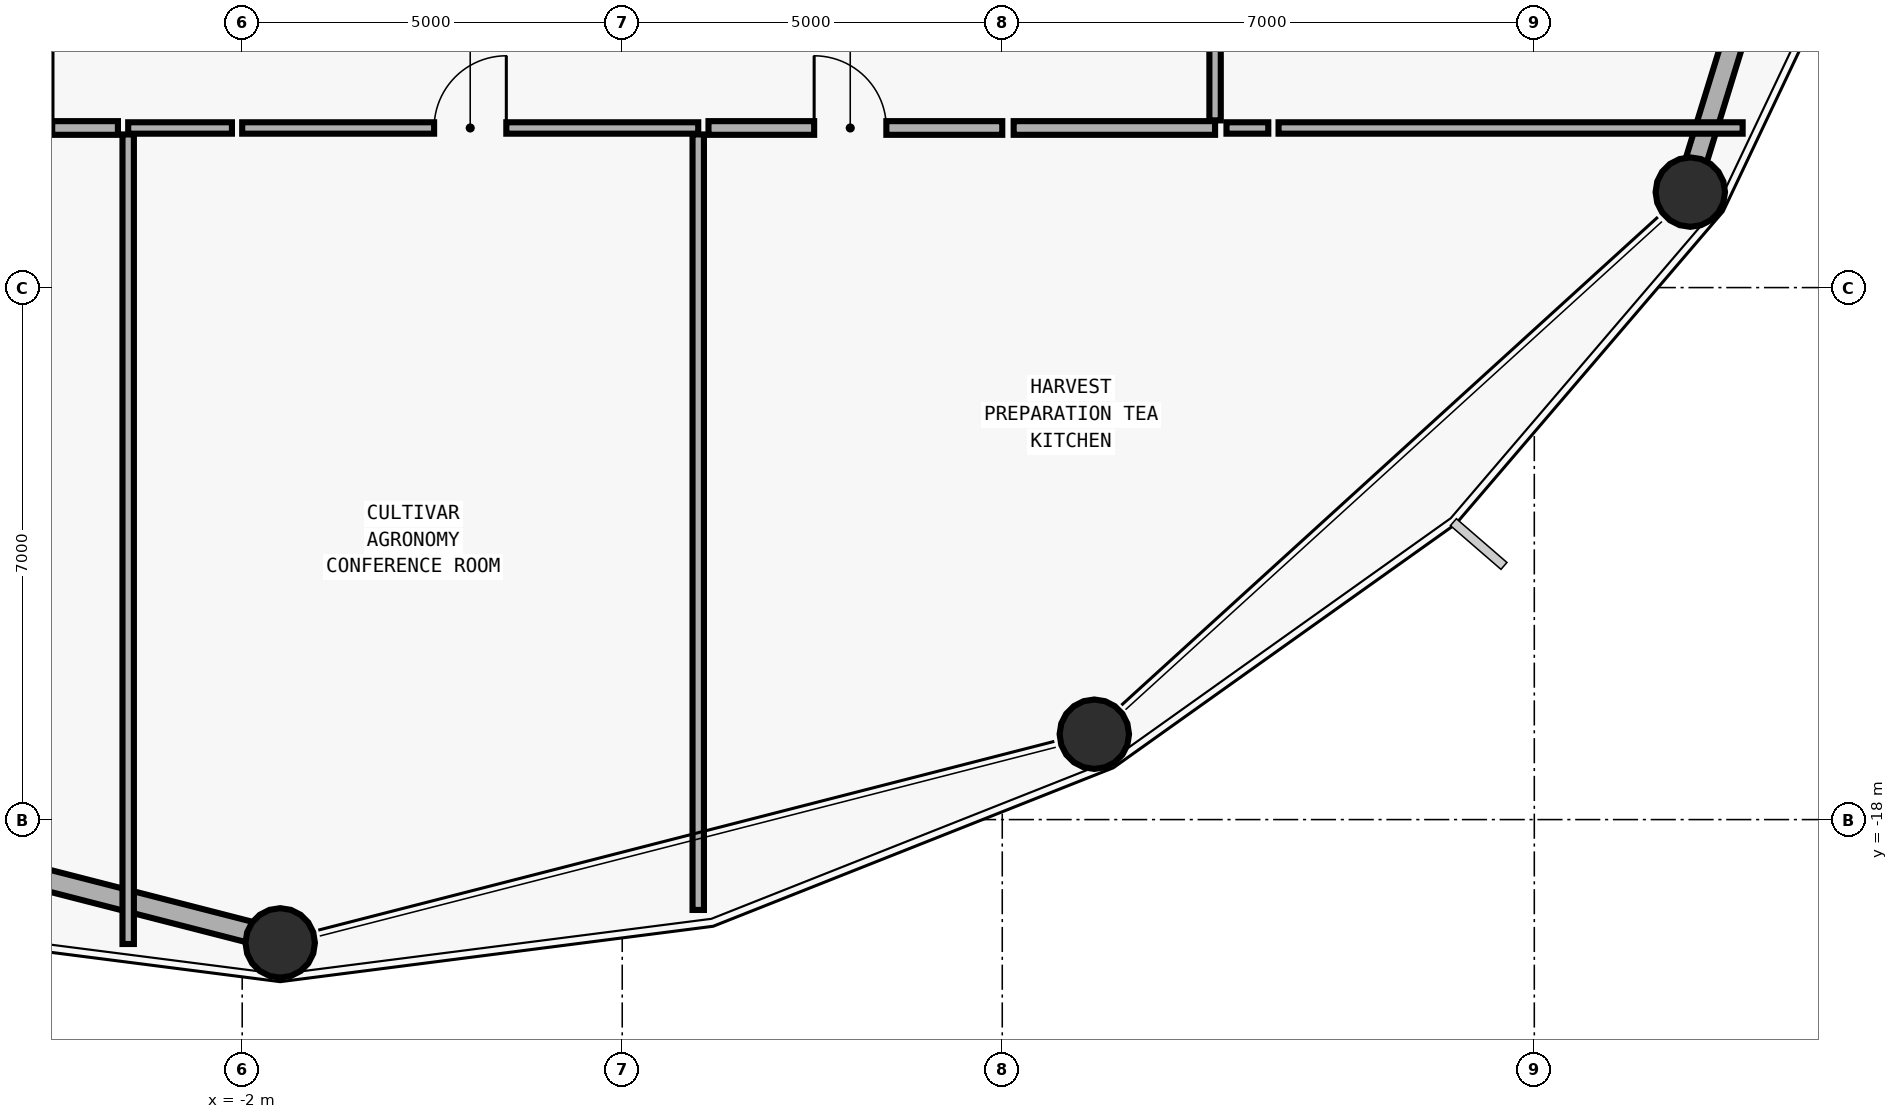
"""IFC4 building model, lengths in metres.
Left out: names, types, materials, properties, quantities, classifications, styles, units other than length and angle.
Written with IfcOpenShell. Run it as: python <this file> out.ifc"""

import sys

from ifc_helpers import new_model, si_unit, direction, frame, frame_2d, origin, origin_2d, place, context, subcontext, project, spatial, rectangle, hollow_circle, extrude, element, fill, save


model = new_model("IFC4")
c1 = context("Model", 3, precision=1e-05, world=origin(), true_north=direction((0.0, 1.0)))
c2 = subcontext(c1, "Body", "Model", "MODEL_VIEW")
j1 = project(units=[si_unit("LENGTHUNIT", "METRE"), si_unit("PLANEANGLEUNIT", "RADIAN")], contexts=[c1])
p1 = place(None, origin())
s1 = spatial("IfcSite", under=j1, at=p1, CompositionType="ELEMENT")
p2 = place(p1, origin())
s2 = spatial("IfcBuilding", under=s1, at=p2, CompositionType="ELEMENT")
p3 = place(p2, frame((0.0, 0.0, 62.7)))
s3 = spatial("IfcBuildingStorey", under=s2, at=p3, CompositionType="ELEMENT", Elevation=62.7)
p4 = place(p3, frame((-1.5, -19.583, 0.0), z_axis=(0.0, -0.020409054637, 0.999791713553), x_axis=(1.0, 0.0, 0.0)))
e1 = element("IfcColumn", 1, at=p4, inside=s3, PredefinedType="COLUMN", context=c2, shape_type="SweptSolid", body=[
    extrude(hollow_circle(Radius=0.457, WallThickness=0.032, at=origin_2d()), origin(), (0.0, 0.0, 1.0), 3.876),
])
p5 = place(p3, frame((9.186, -16.843, 0.0), z_axis=(0.013290608719, -0.017636826737, 0.999756121293), x_axis=(0.798628839349, 0.601823875366, 0.0)))
e2 = element("IfcColumn", 2, at=p5, inside=s3, PredefinedType="COLUMN", context=c2, shape_type="SweptSolid", body=[
    extrude(hollow_circle(Radius=0.457, WallThickness=0.032, at=origin_2d()), origin(), (0.0, 0.0, 1.0), 3.876),
])
p6 = place(p3, frame((17.008, -9.724, 0.0), z_axis=(0.022989211418, -0.01014044668, 0.999684283911), x_axis=(0.403578491135, 0.914945026487, 0.0)))
e3 = element("IfcColumn", 3, at=p6, inside=s3, PredefinedType="COLUMN", context=c2, shape_type="SweptSolid", body=[
    extrude(hollow_circle(Radius=0.457, WallThickness=0.032, at=origin_2d()), origin(), (0.0, 0.0, 1.0), 3.876),
])
p7 = place(p3, frame((-1.899, -19.481, 0.0), z_axis=(0.0, 0.0, 1.0), x_axis=(-0.968647190334, 0.248440376463, 0.0)))
e4 = element("IfcWall", 4, at=p7, inside=s3, PredefinedType="SOLIDWALL", context=c2, shape_type="SweptSolid", body=[
    extrude(rectangle(XDim=10.207, YDim=0.28, at=frame_2d((5.104, 0.0))), origin(), (0.0, 0.0, 1.0), 3.06),
])
p8 = place(p3, frame((19.885, -0.394, 0.0), z_axis=(0.0, 0.0, 1.0), x_axis=(-0.294639825204, -0.95560837868, 0.0)))
e5 = element("IfcWall", 5, at=p8, inside=s3, PredefinedType="SOLIDWALL", context=c2, shape_type="SweptSolid", body=[
    extrude(rectangle(XDim=9.352, YDim=0.28, at=frame_2d((4.676, 0.0))), origin(), (0.0, 0.0, 1.0), 3.06),
])
p9 = place(p3, frame((-2.0, -8.9, 0.0), z_axis=(0.0, 0.0, 1.0), x_axis=(1.0, 0.0, 0.0)))
e6 = element("IfcWall", 6, at=p9, inside=s3, PredefinedType="PARTITIONING", context=c2, shape_type="SweptSolid", body=[
    extrude(rectangle(XDim=6.0, YDim=0.15, at=frame_2d((3.0, 0.0))), origin(), (0.0, 0.0, 1.0), 3.64),
])
p10 = place(p9, frame((2.525, 0.0, 0.0)))
e7 = element("IfcOpeningElement", 7, at=p10, cuts=e6, PredefinedType="OPENING", context=c2, shape_type="SweptSolid", body=[
    extrude(rectangle(XDim=0.95, YDim=2.1, at=frame_2d((0.475, 1.05))), frame((0.0, 0.085, 0.0), z_axis=(0.0, -1.0, 0.0), x_axis=(1.0, 0.0, 0.0)), (0.0, 0.0, 1.0), 0.17),
])
p11 = place(p3, frame((4.135, -8.9, 0.0), z_axis=(0.0, 0.0, 1.0), x_axis=(1.0, 0.0, 0.0)))
e8 = element("IfcWall", 8, at=p11, inside=s3, PredefinedType="PLUMBINGWALL", context=c2, shape_type="SweptSolid", body=[
    extrude(rectangle(XDim=3.865, YDim=0.18, at=frame_2d((1.933, 0.0))), origin(), (0.0, 0.0, 1.0), 3.64),
])
p12 = place(p11, frame((1.39, 0.0, 0.0)))
e9 = element("IfcOpeningElement", 9, at=p12, cuts=e8, PredefinedType="OPENING", context=c2, shape_type="SweptSolid", body=[
    extrude(rectangle(XDim=0.95, YDim=2.1, at=frame_2d((0.475, 1.05))), frame((0.0, 0.1, 0.0), z_axis=(0.0, -1.0, 0.0), x_axis=(1.0, 0.0, 0.0)), (0.0, 0.0, 1.0), 0.2),
])
p13 = place(p3, frame((-3.5, -8.9, 0.0), z_axis=(0.0, 0.0, 1.0), x_axis=(1.0, 0.0, 0.0)))
e10 = element("IfcWall", 10, at=p13, inside=s3, PredefinedType="PARTITIONING", context=c2, shape_type="SweptSolid", body=[
    extrude(rectangle(XDim=1.365, YDim=0.15, at=frame_2d((0.683, 0.0))), origin(), (0.0, 0.0, 1.0), 3.64),
])
p14 = place(p3, frame((4.0, -8.985, 0.0), z_axis=(0.0, 0.0, 1.0), x_axis=(0.0, -1.0, 0.0)))
e11 = element("IfcWall", 11, at=p14, inside=s3, PredefinedType="PARTITIONING", context=c2, shape_type="SweptSolid", body=[
    extrude(rectangle(XDim=10.204, YDim=0.15, at=frame_2d((5.102, 0.0))), origin(), (0.0, 0.0, 1.0), 3.64),
])
p15 = place(p3, frame((-3.5, -19.637, 0.0), z_axis=(0.0, 0.0, 1.0), x_axis=(0.0, 1.0, 0.0)))
e12 = element("IfcWall", 12, at=p15, inside=s3, PredefinedType="PARTITIONING", context=c2, shape_type="SweptSolid", body=[
    extrude(rectangle(XDim=10.652, YDim=0.15, at=frame_2d((5.326, 0.0))), origin(), (0.0, 0.0, 1.0), 3.64),
])
p16 = place(p3, frame((8.15, -8.9, 0.0), z_axis=(0.0, 0.0, 1.0), x_axis=(1.0, 0.0, 0.0)))
e13 = element("IfcWall", 13, at=p16, inside=s3, PredefinedType="PLUMBINGWALL", context=c2, shape_type="SweptSolid", body=[
    extrude(rectangle(XDim=2.65, YDim=0.18, at=frame_2d((1.325, 0.0))), origin(), (0.0, 0.0, 1.0), 3.64),
])
p17 = place(p3, frame((10.95, -8.9, 0.0), z_axis=(0.0, 0.0, 1.0), x_axis=(1.0, 0.0, 0.0)))
e14 = element("IfcWall", 14, at=p17, inside=s3, PredefinedType="PARTITIONING", context=c2, shape_type="SweptSolid", body=[
    extrude(rectangle(XDim=0.55, YDim=0.15, at=frame_2d((0.275, 0.0))), origin(), (0.0, 0.0, 1.0), 3.64),
])
p18 = place(p3, frame((11.635, -8.9, 0.0), z_axis=(0.0, 0.0, 1.0), x_axis=(1.0, 0.0, 0.0)))
e15 = element("IfcWall", 15, at=p18, inside=s3, PredefinedType="PARTITIONING", context=c2, shape_type="SweptSolid", body=[
    extrude(rectangle(XDim=6.106, YDim=0.15, at=frame_2d((3.053, 0.0))), origin(), (0.0, 0.0, 1.0), 2.972),
])
p19 = place(p3, frame((-4.5, -8.9, 0.0), z_axis=(0.0, 0.0, 1.0), x_axis=(1.0, 0.0, 0.0)))
e16 = element("IfcWall", 16, at=p19, inside=s3, PredefinedType="PLUMBINGWALL", context=c2, shape_type="SweptSolid", body=[
    extrude(rectangle(XDim=0.865, YDim=0.18, at=frame_2d((0.433, 0.0))), origin(), (0.0, 0.0, 1.0), 3.64),
])
p20 = place(p3, frame((10.8, -8.8, 0.0), z_axis=(0.0, 0.0, 1.0), x_axis=(0.0, 1.0, 0.0)))
e17 = element("IfcWall", 17, at=p20, inside=s3, PredefinedType="PARTITIONING", context=c2, shape_type="SweptSolid", body=[
    extrude(rectangle(XDim=2.065, YDim=0.15, at=frame_2d((1.032, 0.0))), origin(), (0.0, 0.0, 1.0), 3.64),
])
p21 = place(p10, origin())
e18 = element("IfcDoor", 18, at=p21, inside=s3, OperationType="SINGLE_SWING_RIGHT", PredefinedType="DOOR", context=c2, shape_type="SweptSolid", body=[
    extrude(rectangle(XDim=0.95, YDim=2.1, at=frame_2d((0.475, 1.05))), frame((0.0, 0.025, 0.0), z_axis=(0.0, -1.0, 0.0), x_axis=(1.0, 0.0, 0.0)), (0.0, 0.0, 1.0), 0.05),
])
fill(e7, e18)
p22 = place(p12, origin())
e19 = element("IfcDoor", 19, at=p22, inside=s3, OperationType="SINGLE_SWING_LEFT", PredefinedType="DOOR", context=c2, shape_type="SweptSolid", body=[
    extrude(rectangle(XDim=0.95, YDim=2.1, at=frame_2d((0.475, 1.05))), frame((0.0, 0.025, 0.0), z_axis=(0.0, -1.0, 0.0), x_axis=(1.0, 0.0, 0.0)), (0.0, 0.0, 1.0), 0.05),
])
fill(e9, e19)
save(model, sys.argv[1])
